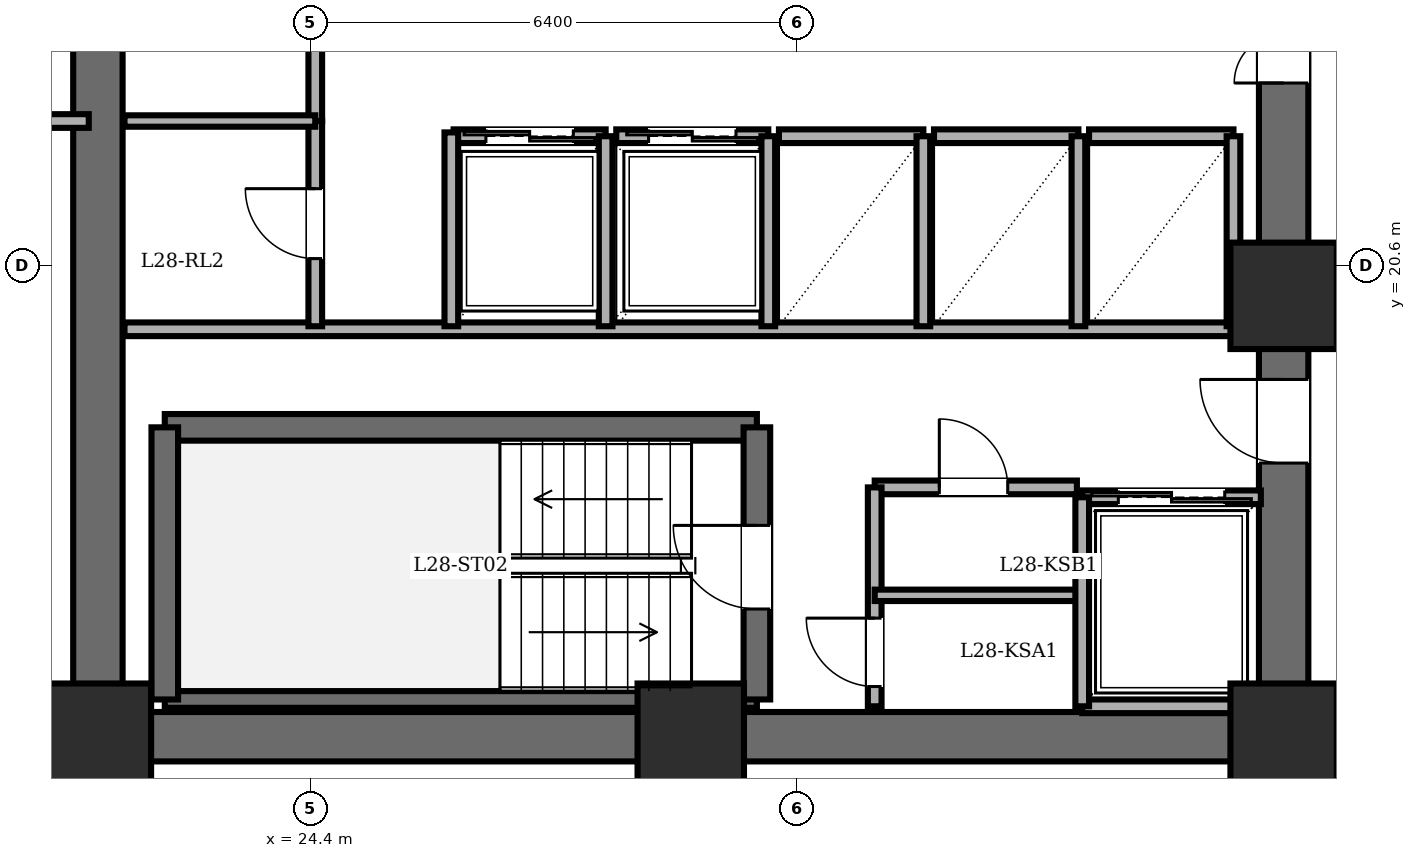
"""IFC4 building model, lengths in metres.
Left out: names, types, materials, properties, quantities, classifications, styles, units other than length and angle.
Written with IfcOpenShell. Run it as: python <this file> out.ifc"""

import sys

from ifc_helpers import new_model, si_unit, direction, frame, frame_2d, origin, origin_2d, place, context, subcontext, project, spatial, rectangle, extrude, element, fill, save


model = new_model("IFC4")
c1 = context("Model", 3, precision=1e-05, world=origin(), true_north=direction((0.0, 1.0)))
c2 = subcontext(c1, "Body", "Model", "MODEL_VIEW")
j1 = project(units=[si_unit("LENGTHUNIT", "METRE"), si_unit("PLANEANGLEUNIT", "RADIAN")], contexts=[c1])
p1 = place(None, origin())
s1 = spatial("IfcSite", under=j1, at=p1, CompositionType="ELEMENT")
p2 = place(p1, origin())
s2 = spatial("IfcBuilding", under=s1, at=p2, CompositionType="ELEMENT")
p3 = place(p2, frame((0.0, 0.0, 107.9)))
s3 = spatial("IfcBuildingStorey", under=s2, at=p3, CompositionType="ELEMENT", Elevation=107.9)
for number, where, z_axis, x_axis in (
    (1, (21.6, 14.4, 0.0), (0.0, 0.0, 1.0), (1.0, 0.0, 0.0)),
    (2, (29.4, 14.4, 0.0), (0.0, 0.0, 1.0), (1.0, 0.0, 0.0)),
    (3, (37.2, 14.4, 0.0), (0.0, 0.0, 1.0), (1.0, 0.0, 0.0)),
    (4, (37.2, 20.2, 0.0), (0.0, 0.0, 1.0), (1.0, 0.0, 0.0)),
):
    element("IfcColumn", number, at=place(p3, frame(where, z_axis=z_axis, x_axis=x_axis)), inside=s3, PredefinedType="COLUMN", context=c2, shape_type="SweptSolid", body=[
        extrude(rectangle(XDim=1.4, YDim=1.4, at=origin_2d()), origin(), (0.0, 0.0, 1.0), 3.6),
    ])
p4 = place(p3, frame((21.6, 14.4, 0.0), z_axis=(0.0, 0.0, 1.0), x_axis=(0.0, 1.0, 0.0)))
e5 = element("IfcWall", 5, at=p4, inside=s3, PredefinedType="SHEAR", context=c2, shape_type="SweptSolid", body=[
    extrude(rectangle(XDim=19.2, YDim=0.65, at=frame_2d((9.6, 0.0))), origin(), (0.0, 0.0, 1.0), 3.4),
])
p5 = place(p3, frame((37.2, 14.4, 0.0), z_axis=(0.0, 0.0, 1.0), x_axis=(-1.0, 0.0, 0.0)))
e6 = element("IfcWall", 6, at=p5, inside=s3, PredefinedType="SHEAR", context=c2, shape_type="SweptSolid", body=[
    extrude(rectangle(XDim=15.6, YDim=0.65, at=frame_2d((7.8, 0.0))), origin(), (0.0, 0.0, 1.0), 3.4),
])
p6 = place(p3, frame((37.2, 14.4, 0.0), z_axis=(0.0, 0.0, 1.0), x_axis=(0.0, 1.0, 0.0)))
e7 = element("IfcWall", 7, at=p6, inside=s3, PredefinedType="SHEAR", context=c2, shape_type="SweptSolid", body=[
    extrude(rectangle(XDim=19.2, YDim=0.65, at=frame_2d((9.6, 0.0))), origin(), (0.0, 0.0, 1.0), 3.4),
])
p7 = place(p6, frame((15.8, 0.0, 0.0)))
e8 = element("IfcOpeningElement", 8, at=p7, cuts=e7, PredefinedType="OPENING", context=c2, shape_type="SweptSolid", body=[
    extrude(rectangle(XDim=1.15, YDim=2.15, at=frame_2d((0.575, 1.075))), frame((0.0, 0.335, 0.0), z_axis=(0.0, -1.0, 0.0), x_axis=(1.0, 0.0, 0.0)), (0.0, 0.0, 1.0), 0.67),
])
p8 = place(p6, frame((3.6, 0.0, 0.0)))
e9 = element("IfcOpeningElement", 9, at=p8, cuts=e7, PredefinedType="OPENING", context=c2, shape_type="SweptSolid", body=[
    extrude(rectangle(XDim=1.1, YDim=2.15, at=frame_2d((0.55, 1.075))), frame((0.0, 0.335, 0.0), z_axis=(0.0, -1.0, 0.0), x_axis=(1.0, 0.0, 0.0)), (0.0, 0.0, 1.0), 0.67),
])
p9 = place(p6, frame((8.6, 0.0, 0.0)))
e10 = element("IfcOpeningElement", 10, at=p9, cuts=e7, PredefinedType="OPENING", context=c2, shape_type="SweptSolid", body=[
    extrude(rectangle(XDim=1.3, YDim=2.2, at=frame_2d((0.65, 1.1))), frame((0.0, 0.335, 0.0), z_axis=(0.0, -1.0, 0.0), x_axis=(1.0, 0.0, 0.0)), (0.0, 0.0, 1.0), 0.67),
])
p10 = place(p3, frame((22.48, 18.47, 0.0), z_axis=(0.0, 0.0, 1.0), x_axis=(1.0, 0.0, 0.0)))
e11 = element("IfcWall", 11, at=p10, inside=s3, PredefinedType="SOLIDWALL", context=c2, shape_type="SweptSolid", body=[
    extrude(rectangle(XDim=7.79, YDim=0.35, at=frame_2d((3.895, 0.0))), origin(), (0.0, 0.0, 1.0), 3.4),
])
p11 = place(p3, frame((22.48, 14.89, 0.0), z_axis=(0.0, 0.0, 1.0), x_axis=(1.0, 0.0, 0.0)))
e12 = element("IfcWall", 12, at=p11, inside=s3, PredefinedType="PARTITIONING", context=c2, shape_type="SweptSolid", body=[
    extrude(rectangle(XDim=7.79, YDim=0.22, at=frame_2d((3.895, 0.0))), origin(), (0.0, 0.0, 1.0), 3.4),
])
p12 = place(p3, frame((22.48, 14.89, 0.0), z_axis=(0.0, 0.0, 1.0), x_axis=(0.0, 1.0, 0.0)))
e13 = element("IfcWall", 13, at=p12, inside=s3, PredefinedType="SOLIDWALL", context=c2, shape_type="SweptSolid", body=[
    extrude(rectangle(XDim=3.58, YDim=0.35, at=frame_2d((1.79, 0.0))), origin(), (0.0, 0.0, 1.0), 3.4),
])
p13 = place(p3, frame((30.27, 14.89, 0.0), z_axis=(0.0, 0.0, 1.0), x_axis=(0.0, 1.0, 0.0)))
e14 = element("IfcWall", 14, at=p13, inside=s3, PredefinedType="SOLIDWALL", context=c2, shape_type="SweptSolid", body=[
    extrude(rectangle(XDim=3.58, YDim=0.35, at=frame_2d((1.79, 0.0))), origin(), (0.0, 0.0, 1.0), 3.4),
])
p14 = place(p13, frame((1.19, 0.0, 0.0)))
e15 = element("IfcOpeningElement", 15, at=p14, cuts=e14, PredefinedType="OPENING", context=c2, shape_type="SweptSolid", body=[
    extrude(rectangle(XDim=1.1, YDim=2.15, at=frame_2d((0.55, 1.075))), frame((0.0, 0.185, 0.0), z_axis=(0.0, -1.0, 0.0), x_axis=(1.0, 0.0, 0.0)), (0.0, 0.0, 1.0), 0.37),
])
p15 = place(p3, frame((21.95, 19.76, 0.0), z_axis=(0.0, 0.0, 1.0), x_axis=(1.0, 0.0, 0.0)))
e16 = element("IfcWall", 16, at=p15, inside=s3, PredefinedType="PARTITIONING", context=c2, shape_type="SweptSolid", body=[
    extrude(rectangle(XDim=14.87, YDim=0.18, at=frame_2d((7.435, 0.0))), origin(), (0.0, 0.0, 1.0), 3.4),
])
p16 = place(p3, frame((31.82, 17.68, 0.0), z_axis=(0.0, 0.0, 1.0), x_axis=(1.0, 0.0, 0.0)))
e17 = element("IfcWall", 17, at=p16, inside=s3, PredefinedType="PARTITIONING", context=c2, shape_type="SweptSolid", body=[
    extrude(rectangle(XDim=2.66, YDim=0.18, at=frame_2d((1.33, 0.0))), origin(), (0.0, 0.0, 1.0), 3.4),
])
p17 = place(p16, frame((0.85, 0.0, 0.0)))
e18 = element("IfcOpeningElement", 18, at=p17, cuts=e17, PredefinedType="OPENING", context=c2, shape_type="SweptSolid", body=[
    extrude(rectangle(XDim=0.9, YDim=2.05, at=frame_2d((0.45, 1.025))), frame((0.0, 0.1, 0.0), z_axis=(0.0, -1.0, 0.0), x_axis=(1.0, 0.0, 0.0)), (0.0, 0.0, 1.0), 0.2),
])
p18 = place(p3, frame((31.82, 14.8, 0.0), z_axis=(0.0, 0.0, 1.0), x_axis=(0.0, 1.0, 0.0)))
e19 = element("IfcWall", 19, at=p18, inside=s3, PredefinedType="PARTITIONING", context=c2, shape_type="SweptSolid", body=[
    extrude(rectangle(XDim=2.88, YDim=0.18, at=frame_2d((1.44, 0.0))), origin(), (0.0, 0.0, 1.0), 3.4),
])
p19 = place(p18, frame((0.26, 0.0, 0.0)))
e20 = element("IfcOpeningElement", 20, at=p19, cuts=e19, PredefinedType="OPENING", context=c2, shape_type="SweptSolid", body=[
    extrude(rectangle(XDim=0.9, YDim=2.05, at=frame_2d((0.45, 1.025))), frame((0.0, 0.1, 0.0), z_axis=(0.0, -1.0, 0.0), x_axis=(1.0, 0.0, 0.0)), (0.0, 0.0, 1.0), 0.2),
])
p20 = place(p3, frame((31.82, 16.26, 0.0), z_axis=(0.0, 0.0, 1.0), x_axis=(1.0, 0.0, 0.0)))
e21 = element("IfcWall", 21, at=p20, inside=s3, PredefinedType="PARTITIONING", context=c2, shape_type="SweptSolid", body=[
    extrude(rectangle(XDim=2.66, YDim=0.15, at=frame_2d((1.33, 0.0))), origin(), (0.0, 0.0, 1.0), 3.4),
])
p21 = place(p3, frame((34.55, 17.55, 0.0), z_axis=(0.0, 0.0, 1.0), x_axis=(1.0, 0.0, 0.0)))
e22 = element("IfcWall", 22, at=p21, inside=s3, PredefinedType="PARTITIONING", context=c2, shape_type="SweptSolid", body=[
    extrude(rectangle(XDim=2.35, YDim=0.18, at=frame_2d((1.175, 0.0))), origin(), (0.0, 0.0, 1.0), 3.4),
])
p22 = place(p21, frame((0.475, 0.0, 0.0)))
e23 = element("IfcOpeningElement", 23, at=p22, cuts=e22, PredefinedType="OPENING", context=c2, shape_type="SweptSolid", body=[
    extrude(rectangle(XDim=1.4, YDim=2.3, at=frame_2d((0.7, 1.15))), frame((0.0, 0.1, 0.0), z_axis=(0.0, -1.0, 0.0), x_axis=(1.0, 0.0, 0.0)), (0.0, 0.0, 1.0), 0.2),
])
p23 = place(p3, frame((36.9, 14.8, 0.0), z_axis=(0.0, 0.0, 1.0), x_axis=(-1.0, 0.0, 0.0)))
e24 = element("IfcWall", 24, at=p23, inside=s3, PredefinedType="PARTITIONING", context=c2, shape_type="SweptSolid", body=[
    extrude(rectangle(XDim=2.35, YDim=0.18, at=frame_2d((1.175, 0.0))), origin(), (0.0, 0.0, 1.0), 3.4),
])
p24 = place(p3, frame((34.55, 17.55, 0.0), z_axis=(0.0, 0.0, 1.0), x_axis=(0.0, -1.0, 0.0)))
e25 = element("IfcWall", 25, at=p24, inside=s3, PredefinedType="PARTITIONING", context=c2, shape_type="SweptSolid", body=[
    extrude(rectangle(XDim=2.75, YDim=0.18, at=frame_2d((1.375, 0.0))), origin(), (0.0, 0.0, 1.0), 3.4),
])
p25 = place(p3, frame((26.28, 22.3, 0.0), z_axis=(0.0, 0.0, 1.0), x_axis=(1.0, 0.0, 0.0)))
e26 = element("IfcWall", 26, at=p25, inside=s3, PredefinedType="PARTITIONING", context=c2, shape_type="SweptSolid", body=[
    extrude(rectangle(XDim=2.0, YDim=0.18, at=frame_2d((1.0, 0.0))), origin(), (0.0, 0.0, 1.0), 3.4),
])
p26 = place(p25, frame((0.425, 0.0, 0.0)))
e27 = element("IfcOpeningElement", 27, at=p26, cuts=e26, PredefinedType="OPENING", context=c2, shape_type="SweptSolid", body=[
    extrude(rectangle(XDim=1.15, YDim=2.2, at=frame_2d((0.575, 1.1))), frame((0.0, 0.1, 0.0), z_axis=(0.0, -1.0, 0.0), x_axis=(1.0, 0.0, 0.0)), (0.0, 0.0, 1.0), 0.2),
])
p27 = place(p3, frame((28.28, 19.8, 0.0), z_axis=(0.0, 0.0, 1.0), x_axis=(0.0, 1.0, 0.0)))
e28 = element("IfcWall", 28, at=p27, inside=s3, PredefinedType="PARTITIONING", context=c2, shape_type="SweptSolid", body=[
    extrude(rectangle(XDim=2.5, YDim=0.18, at=frame_2d((1.25, 0.0))), origin(), (0.0, 0.0, 1.0), 3.4),
])
p28 = place(p3, frame((28.42, 22.3, 0.0), z_axis=(0.0, 0.0, 1.0), x_axis=(1.0, 0.0, 0.0)))
e29 = element("IfcWall", 29, at=p28, inside=s3, PredefinedType="PARTITIONING", context=c2, shape_type="SweptSolid", body=[
    extrude(rectangle(XDim=2.0, YDim=0.18, at=frame_2d((1.0, 0.0))), origin(), (0.0, 0.0, 1.0), 3.4),
])
p29 = place(p28, frame((0.425, 0.0, 0.0)))
e30 = element("IfcOpeningElement", 30, at=p29, cuts=e29, PredefinedType="OPENING", context=c2, shape_type="SweptSolid", body=[
    extrude(rectangle(XDim=1.15, YDim=2.2, at=frame_2d((0.575, 1.1))), frame((0.0, 0.1, 0.0), z_axis=(0.0, -1.0, 0.0), x_axis=(1.0, 0.0, 0.0)), (0.0, 0.0, 1.0), 0.2),
])
p30 = place(p3, frame((30.42, 19.8, 0.0), z_axis=(0.0, 0.0, 1.0), x_axis=(0.0, 1.0, 0.0)))
e31 = element("IfcWall", 31, at=p30, inside=s3, PredefinedType="PARTITIONING", context=c2, shape_type="SweptSolid", body=[
    extrude(rectangle(XDim=2.5, YDim=0.18, at=frame_2d((1.25, 0.0))), origin(), (0.0, 0.0, 1.0), 3.4),
])
p31 = place(p3, frame((30.56, 22.3, 0.0), z_axis=(0.0, 0.0, 1.0), x_axis=(1.0, 0.0, 0.0)))
e32 = element("IfcWall", 32, at=p31, inside=s3, PredefinedType="PARTITIONING", context=c2, shape_type="SweptSolid", body=[
    extrude(rectangle(XDim=1.9, YDim=0.18, at=frame_2d((0.95, 0.0))), origin(), (0.0, 0.0, 1.0), 3.4),
])
p32 = place(p3, frame((32.46, 19.8, 0.0), z_axis=(0.0, 0.0, 1.0), x_axis=(0.0, 1.0, 0.0)))
e33 = element("IfcWall", 33, at=p32, inside=s3, PredefinedType="PARTITIONING", context=c2, shape_type="SweptSolid", body=[
    extrude(rectangle(XDim=2.5, YDim=0.18, at=frame_2d((1.25, 0.0))), origin(), (0.0, 0.0, 1.0), 3.4),
])
p33 = place(p3, frame((32.6, 22.3, 0.0), z_axis=(0.0, 0.0, 1.0), x_axis=(1.0, 0.0, 0.0)))
e34 = element("IfcWall", 34, at=p33, inside=s3, PredefinedType="PARTITIONING", context=c2, shape_type="SweptSolid", body=[
    extrude(rectangle(XDim=1.9, YDim=0.18, at=frame_2d((0.95, 0.0))), origin(), (0.0, 0.0, 1.0), 3.4),
])
p34 = place(p3, frame((34.5, 19.8, 0.0), z_axis=(0.0, 0.0, 1.0), x_axis=(0.0, 1.0, 0.0)))
e35 = element("IfcWall", 35, at=p34, inside=s3, PredefinedType="PARTITIONING", context=c2, shape_type="SweptSolid", body=[
    extrude(rectangle(XDim=2.5, YDim=0.18, at=frame_2d((1.25, 0.0))), origin(), (0.0, 0.0, 1.0), 3.4),
])
p35 = place(p3, frame((34.64, 22.3, 0.0), z_axis=(0.0, 0.0, 1.0), x_axis=(1.0, 0.0, 0.0)))
e36 = element("IfcWall", 36, at=p35, inside=s3, PredefinedType="PARTITIONING", context=c2, shape_type="SweptSolid", body=[
    extrude(rectangle(XDim=1.9, YDim=0.18, at=frame_2d((0.95, 0.0))), origin(), (0.0, 0.0, 1.0), 3.4),
])
p36 = place(p3, frame((36.54, 19.8, 0.0), z_axis=(0.0, 0.0, 1.0), x_axis=(0.0, 1.0, 0.0)))
e37 = element("IfcWall", 37, at=p36, inside=s3, PredefinedType="PARTITIONING", context=c2, shape_type="SweptSolid", body=[
    extrude(rectangle(XDim=2.5, YDim=0.18, at=frame_2d((1.25, 0.0))), origin(), (0.0, 0.0, 1.0), 3.4),
])
p37 = place(p3, frame((24.46, 22.5, 0.0), z_axis=(0.0, 0.0, 1.0), x_axis=(0.0, 1.0, 0.0)))
e38 = element("IfcWall", 38, at=p37, inside=s3, PredefinedType="PARTITIONING", context=c2, shape_type="SweptSolid", body=[
    extrude(rectangle(XDim=5.0, YDim=0.18, at=frame_2d((2.5, 0.0))), origin(), (0.0, 0.0, 1.0), 3.4),
])
p38 = place(p37, frame((2.04, 0.0, 0.0)))
e39 = element("IfcOpeningElement", 39, at=p38, cuts=e38, PredefinedType="OPENING", context=c2, shape_type="SweptSolid", body=[
    extrude(rectangle(XDim=0.92, YDim=2.1, at=frame_2d((0.46, 1.05))), frame((0.0, 0.1, 0.0), z_axis=(0.0, -1.0, 0.0), x_axis=(1.0, 0.0, 0.0)), (0.0, 0.0, 1.0), 0.2),
])
p39 = place(p3, frame((24.46, 19.8, 0.0), z_axis=(0.0, 0.0, 1.0), x_axis=(0.0, 1.0, 0.0)))
e40 = element("IfcWall", 40, at=p39, inside=s3, PredefinedType="PARTITIONING", context=c2, shape_type="SweptSolid", body=[
    extrude(rectangle(XDim=2.7, YDim=0.18, at=frame_2d((1.35, 0.0))), origin(), (0.0, 0.0, 1.0), 3.4),
])
p40 = place(p39, frame((0.89, 0.0, 0.0)))
e41 = element("IfcOpeningElement", 41, at=p40, cuts=e40, PredefinedType="OPENING", context=c2, shape_type="SweptSolid", body=[
    extrude(rectangle(XDim=0.92, YDim=2.1, at=frame_2d((0.46, 1.05))), frame((0.0, 0.1, 0.0), z_axis=(0.0, -1.0, 0.0), x_axis=(1.0, 0.0, 0.0)), (0.0, 0.0, 1.0), 0.2),
])
p41 = place(p3, frame((21.95, 22.5, 0.0), z_axis=(0.0, 0.0, 1.0), x_axis=(1.0, 0.0, 0.0)))
e42 = element("IfcWall", 42, at=p41, inside=s3, PredefinedType="PARTITIONING", context=c2, shape_type="SweptSolid", body=[
    extrude(rectangle(XDim=2.51, YDim=0.15, at=frame_2d((1.255, 0.0))), origin(), (0.0, 0.0, 1.0), 3.4),
])
p42 = place(p3, frame((26.25, 19.8, 0.0), z_axis=(0.0, 0.0, 1.0), x_axis=(0.0, 1.0, 0.0)))
e43 = element("IfcWall", 43, at=p42, inside=s3, PredefinedType="PARTITIONING", context=c2, shape_type="SweptSolid", body=[
    extrude(rectangle(XDim=2.55, YDim=0.18, at=frame_2d((1.275, 0.0))), origin(), (0.0, 0.0, 1.0), 3.4),
])
p43 = place(p3, frame((8.8, 14.18, 0.0), z_axis=(0.0, 0.0, 1.0), x_axis=(1.0, 0.0, 0.0)))
e44 = element("IfcWall", 44, at=p43, inside=s3, PredefinedType="PARTITIONING", context=c2, shape_type="SweptSolid", body=[
    extrude(rectangle(XDim=12.68, YDim=0.18, at=frame_2d((6.34, 0.0))), origin(), (0.0, 0.0, 1.0), 3.4),
])
p44 = place(p43, frame((6.18, 0.0, 0.0)))
e45 = element("IfcOpeningElement", 45, at=p44, cuts=e44, PredefinedType="OPENING", context=c2, shape_type="SweptSolid", body=[
    extrude(rectangle(XDim=1.0, YDim=2.15, at=frame_2d((0.5, 1.075))), frame((0.0, 0.1, 0.0), z_axis=(0.0, -1.0, 0.0), x_axis=(1.0, 0.0, 0.0)), (0.0, 0.0, 1.0), 0.2),
])
p45 = place(p3, frame((8.8, 22.5, 0.0), z_axis=(0.0, 0.0, 1.0), x_axis=(1.0, 0.0, 0.0)))
e46 = element("IfcWall", 46, at=p45, inside=s3, PredefinedType="PARTITIONING", context=c2, shape_type="SweptSolid", body=[
    extrude(rectangle(XDim=12.68, YDim=0.18, at=frame_2d((6.34, 0.0))), origin(), (0.0, 0.0, 1.0), 3.4),
])
p46 = place(p14, origin())
e47 = element("IfcDoor", 47, at=p46, inside=s3, OperationType="SINGLE_SWING_RIGHT", PredefinedType="DOOR", context=c2, shape_type="SweptSolid", body=[
    extrude(rectangle(XDim=1.1, YDim=2.15, at=frame_2d((0.55, 1.075))), frame((0.0, 0.025, 0.0), z_axis=(0.0, -1.0, 0.0), x_axis=(1.0, 0.0, 0.0)), (0.0, 0.0, 1.0), 0.05),
])
fill(e15, e47)
p47 = place(p8, origin())
e48 = element("IfcDoor", 48, at=p47, inside=s3, OperationType="SINGLE_SWING_RIGHT", PredefinedType="DOOR", context=c2, shape_type="SweptSolid", body=[
    extrude(rectangle(XDim=1.1, YDim=2.15, at=frame_2d((0.55, 1.075))), frame((0.0, 0.025, 0.0), z_axis=(0.0, -1.0, 0.0), x_axis=(1.0, 0.0, 0.0)), (0.0, 0.0, 1.0), 0.05),
])
fill(e9, e48)
p48 = place(p17, origin())
e49 = element("IfcDoor", 49, at=p48, inside=s3, OperationType="SINGLE_SWING_LEFT", PredefinedType="DOOR", context=c2, shape_type="SweptSolid", body=[
    extrude(rectangle(XDim=0.9, YDim=2.05, at=frame_2d((0.45, 1.025))), frame((0.0, 0.025, 0.0), z_axis=(0.0, -1.0, 0.0), x_axis=(1.0, 0.0, 0.0)), (0.0, 0.0, 1.0), 0.05),
])
fill(e18, e49)
p49 = place(p19, origin())
e50 = element("IfcDoor", 50, at=p49, inside=s3, OperationType="SINGLE_SWING_RIGHT", PredefinedType="DOOR", context=c2, shape_type="SweptSolid", body=[
    extrude(rectangle(XDim=0.9, YDim=2.05, at=frame_2d((0.45, 1.025))), frame((0.0, 0.025, 0.0), z_axis=(0.0, -1.0, 0.0), x_axis=(1.0, 0.0, 0.0)), (0.0, 0.0, 1.0), 0.05),
])
fill(e20, e50)
p50 = place(p22, origin())
e51 = element("IfcDoor", 51, at=p50, inside=s3, OperationType="DOUBLE_DOOR_SLIDING", PredefinedType="DOOR", context=c2, shape_type="SweptSolid", body=[
    extrude(rectangle(XDim=1.4, YDim=2.3, at=frame_2d((0.7, 1.15))), frame((0.0, 0.025, 0.0), z_axis=(0.0, -1.0, 0.0), x_axis=(1.0, 0.0, 0.0)), (0.0, 0.0, 1.0), 0.05),
])
fill(e23, e51)
p51 = place(p26, origin())
e52 = element("IfcDoor", 52, at=p51, inside=s3, OperationType="DOUBLE_DOOR_SLIDING", PredefinedType="DOOR", context=c2, shape_type="SweptSolid", body=[
    extrude(rectangle(XDim=1.15, YDim=2.2, at=frame_2d((0.575, 1.1))), frame((0.0, 0.025, 0.0), z_axis=(0.0, -1.0, 0.0), x_axis=(1.0, 0.0, 0.0)), (0.0, 0.0, 1.0), 0.05),
])
fill(e27, e52)
p52 = place(p29, origin())
e53 = element("IfcDoor", 53, at=p52, inside=s3, OperationType="DOUBLE_DOOR_SLIDING", PredefinedType="DOOR", context=c2, shape_type="SweptSolid", body=[
    extrude(rectangle(XDim=1.15, YDim=2.2, at=frame_2d((0.575, 1.1))), frame((0.0, 0.025, 0.0), z_axis=(0.0, -1.0, 0.0), x_axis=(1.0, 0.0, 0.0)), (0.0, 0.0, 1.0), 0.05),
])
fill(e30, e53)
p53 = place(p40, origin())
e54 = element("IfcDoor", 54, at=p53, inside=s3, OperationType="SINGLE_SWING_RIGHT", PredefinedType="DOOR", context=c2, shape_type="SweptSolid", body=[
    extrude(rectangle(XDim=0.92, YDim=2.1, at=frame_2d((0.46, 1.05))), frame((0.0, 0.025, 0.0), z_axis=(0.0, -1.0, 0.0), x_axis=(1.0, 0.0, 0.0)), (0.0, 0.0, 1.0), 0.05),
])
fill(e41, e54)
p54 = place(p9, origin())
e55 = element("IfcDoor", 55, at=p54, inside=s3, OperationType="DOUBLE_DOOR_SINGLE_SWING", PredefinedType="DOOR", context=c2, shape_type="SweptSolid", body=[
    extrude(rectangle(XDim=1.3, YDim=2.2, at=frame_2d((0.65, 1.1))), frame((0.0, 0.025, 0.0), z_axis=(0.0, -1.0, 0.0), x_axis=(1.0, 0.0, 0.0)), (0.0, 0.0, 1.0), 0.05),
])
fill(e10, e55)
save(model, sys.argv[1])
